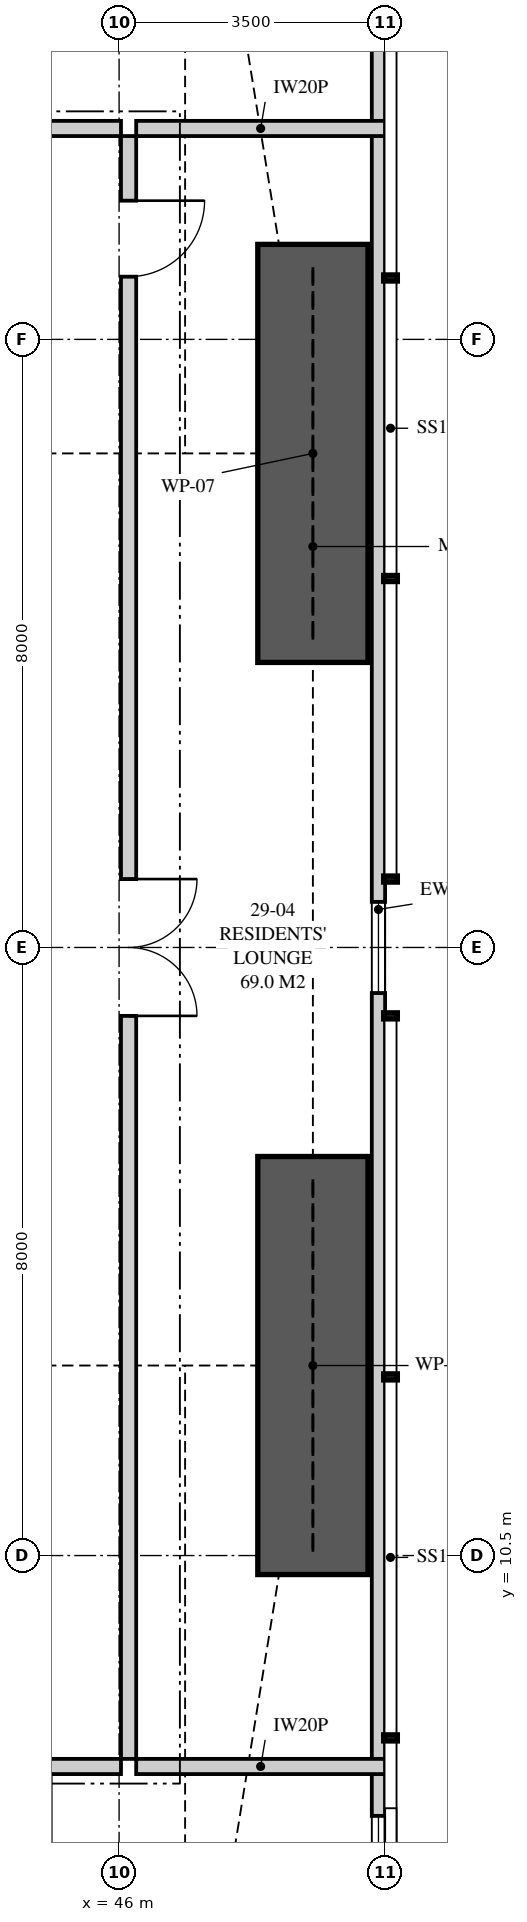
"""IFC4 building model, lengths in metres.
Left out: names, types, materials, properties, quantities, classifications, styles, units other than length and angle.
Written with IfcOpenShell. Run it as: python <this file> out.ifc"""

import sys

from ifc_helpers import new_model, si_unit, direction, frame, frame_2d, origin, place, context, subcontext, project, spatial, polyline, rectangle, outline, extrude, element, fill, save


model = new_model("IFC4")
c1 = context("Model", 3, precision=1e-05, world=origin(), true_north=direction((0.0, 1.0)))
c2 = subcontext(c1, "Body", "Model", "MODEL_VIEW")
j1 = project(units=[si_unit("LENGTHUNIT", "METRE"), si_unit("PLANEANGLEUNIT", "RADIAN")], contexts=[c1])
p1 = place(None, origin())
s1 = spatial("IfcSite", under=j1, at=p1, CompositionType="ELEMENT")
p2 = place(p1, origin())
s2 = spatial("IfcBuilding", under=s1, at=p2, CompositionType="ELEMENT")
p3 = place(p2, frame((0.0, 0.0, 108.2)))
s3 = spatial("IfcBuildingStorey", under=s2, at=p3, CompositionType="ELEMENT", Elevation=108.2)
p4 = place(p3, frame((49.413, 3.051, 0.0), z_axis=(0.0, 0.0, 1.0), x_axis=(0.0, 1.0, 0.0)))
e1 = element("IfcWall", 1, at=p4, inside=s3, PredefinedType="SOLIDWALL", context=c2, shape_type="SweptSolid", body=[
    extrude(outline(polyline([(0.0, 0.0), (31.897, 0.0), (31.897, 3.11), (22.167, 3.11), (22.167, 2.15), (22.074, 2.15), (22.074, 3.11), (21.949, 3.11), (21.949, 2.15), (9.949, 2.15), (9.949, 3.11), (9.823, 3.11), (9.823, 2.15), (9.73, 2.15), (9.73, 3.11), (0.0, 3.11), (0.0, 0.0)])), frame((0.0, 0.087, 0.0), z_axis=(0.0, -1.0, 0.0), x_axis=(1.0, 0.0, 0.0)), (0.0, 0.0, 1.0), 0.175),
])
p5 = place(p4, frame((2.224, 0.0, 0.4)))
e2 = element("IfcOpeningElement", 2, at=p5, cuts=e1, PredefinedType="OPENING", context=c2, shape_type="SweptSolid", body=[
    extrude(rectangle(XDim=1.8, YDim=1.7, at=frame_2d((0.9, 0.85))), frame((0.0, 0.097, 0.0), z_axis=(0.0, -1.0, 0.0), x_axis=(1.0, 0.0, 0.0)), (0.0, 0.0, 1.0), 0.195),
])
p6 = place(p4, frame((14.849, 0.0, 0.4)))
e3 = element("IfcOpeningElement", 3, at=p6, cuts=e1, PredefinedType="OPENING", context=c2, shape_type="SweptSolid", body=[
    extrude(rectangle(XDim=1.2, YDim=1.7, at=frame_2d((0.6, 0.85))), frame((0.0, 0.097, 0.0), z_axis=(0.0, -1.0, 0.0), x_axis=(1.0, 0.0, 0.0)), (0.0, 0.0, 1.0), 0.195),
])
p7 = place(p4, frame((28.51, 0.0, 0.4)))
e4 = element("IfcOpeningElement", 4, at=p7, cuts=e1, PredefinedType="OPENING", context=c2, shape_type="SweptSolid", body=[
    extrude(rectangle(XDim=1.2, YDim=1.7, at=frame_2d((0.6, 0.85))), frame((0.0, 0.097, 0.0), z_axis=(0.0, -1.0, 0.0), x_axis=(1.0, 0.0, 0.0)), (0.0, 0.0, 1.0), 0.195),
])
p8 = place(p3, frame((39.9, 7.725, 0.0), z_axis=(0.0, 0.0, 1.0), x_axis=(1.0, 0.0, 0.0)))
e5 = element("IfcWall", 5, at=p8, inside=s3, PredefinedType="PARTITIONING", context=c2, shape_type="SweptSolid", body=[
    extrude(rectangle(XDim=6.125, YDim=0.2, at=frame_2d((3.062, 0.0))), origin(), (0.0, 0.0, 1.0), 3.11),
])
p9 = place(p8, frame((1.5, 0.0, 0.0)))
e6 = element("IfcOpeningElement", 6, at=p9, cuts=e5, PredefinedType="OPENING", context=c2, shape_type="SweptSolid", body=[
    extrude(rectangle(XDim=1.05, YDim=2.2, at=frame_2d((0.525, 1.1))), frame((0.0, 0.11, 0.0), z_axis=(0.0, -1.0, 0.0), x_axis=(1.0, 0.0, 0.0)), (0.0, 0.0, 1.0), 0.22),
])
p10 = place(p3, frame((46.225, 7.725, 0.0), z_axis=(0.0, 0.0, 1.0), x_axis=(1.0, 0.0, 0.0)))
e7 = element("IfcWall", 7, at=p10, inside=s3, PredefinedType="PARTITIONING", context=c2, shape_type="SweptSolid", body=[
    extrude(outline(polyline([(0.0, 0.0), (3.275, 0.0), (3.275, 3.11), (2.392, 3.11), (2.392, 2.15), (0.643, 2.15), (0.643, 2.541), (0.306, 2.541), (0.306, 3.11), (0.0, 3.11), (0.0, 0.0)])), frame((0.0, 0.1, 0.0), z_axis=(0.0, -1.0, 0.0), x_axis=(1.0, 0.0, 0.0)), (0.0, 0.0, 1.0), 0.2),
])
p11 = place(p3, frame((40.75, 29.275, 0.0), z_axis=(0.0, 0.0, 1.0), x_axis=(1.0, 0.0, 0.0)))
e8 = element("IfcWall", 8, at=p11, inside=s3, PredefinedType="PARTITIONING", context=c2, shape_type="SweptSolid", body=[
    extrude(rectangle(XDim=5.275, YDim=0.2, at=frame_2d((2.637, 0.0))), origin(), (0.0, 0.0, 1.0), 3.11),
])
p12 = place(p11, frame((1.738, 0.0, 0.0)))
e9 = element("IfcOpeningElement", 9, at=p12, cuts=e8, PredefinedType="OPENING", context=c2, shape_type="SweptSolid", body=[
    extrude(rectangle(XDim=1.8, YDim=2.1, at=frame_2d((0.9, 1.05))), frame((0.0, 0.11, 0.0), z_axis=(0.0, -1.0, 0.0), x_axis=(1.0, 0.0, 0.0)), (0.0, 0.0, 1.0), 0.22),
])
p13 = place(p3, frame((46.225, 29.275, 0.0), z_axis=(0.0, 0.0, 1.0), x_axis=(1.0, 0.0, 0.0)))
e10 = element("IfcWall", 10, at=p13, inside=s3, PredefinedType="PARTITIONING", context=c2, shape_type="SweptSolid", body=[
    extrude(outline(polyline([(0.0, 0.0), (3.275, 0.0), (3.275, 3.11), (2.554, 3.11), (2.554, 2.15), (0.805, 2.15), (0.805, 2.541), (0.306, 2.541), (0.306, 3.11), (0.0, 3.11), (0.0, 0.0)])), frame((0.0, 0.1, 0.0), z_axis=(0.0, -1.0, 0.0), x_axis=(1.0, 0.0, 0.0)), (0.0, 0.0, 1.0), 0.2),
])
p14 = place(p3, frame((46.125, 7.825, 0.0), z_axis=(0.0, 0.0, 1.0), x_axis=(0.0, 1.0, 0.0)))
e11 = element("IfcWall", 11, at=p14, inside=s3, PredefinedType="PARTITIONING", context=c2, shape_type="SweptSolid", body=[
    extrude(outline(polyline([(0.0, 0.0), (21.35, 0.0), (21.35, 3.11), (17.512, 3.11), (17.512, 2.541), (16.838, 2.541), (16.838, 3.11), (5.512, 3.11), (5.512, 2.541), (4.838, 2.541), (4.838, 3.11), (0.0, 3.11), (0.0, 0.0)])), frame((0.0, 0.1, 0.0), z_axis=(0.0, -1.0, 0.0), x_axis=(1.0, 0.0, 0.0)), (0.0, 0.0, 1.0), 0.2),
])
p15 = place(p14, frame((9.775, 0.0, 0.0)))
e12 = element("IfcOpeningElement", 12, at=p15, cuts=e11, PredefinedType="OPENING", context=c2, shape_type="SweptSolid", body=[
    extrude(rectangle(XDim=1.8, YDim=2.1, at=frame_2d((0.9, 1.05))), frame((0.0, 0.11, 0.0), z_axis=(0.0, -1.0, 0.0), x_axis=(1.0, 0.0, 0.0)), (0.0, 0.0, 1.0), 0.22),
])
p16 = place(p14, frame((19.5, 0.0, 0.0)))
e13 = element("IfcOpeningElement", 13, at=p16, cuts=e11, PredefinedType="OPENING", context=c2, shape_type="SweptSolid", body=[
    extrude(rectangle(XDim=1.0, YDim=2.1, at=frame_2d((0.5, 1.05))), frame((0.0, 0.11, 0.0), z_axis=(0.0, -1.0, 0.0), x_axis=(1.0, 0.0, 0.0)), (0.0, 0.0, 1.0), 0.22),
])
for number, where, z_axis, x_axis in (
    (14, (48.55, 10.25, 0.0), (0.0, 0.0, 1.0), (0.0, 1.0, 0.0)),
    (15, (48.55, 22.25, 0.0), (0.0, 0.0, 1.0), (0.0, 1.0, 0.0)),
):
    element("IfcWall", number, at=place(p3, frame(where, z_axis=z_axis, x_axis=x_axis)), inside=s3, PredefinedType="SHEAR", context=c2, shape_type="SweptSolid", body=[
        extrude(rectangle(XDim=5.5, YDim=1.45, at=frame_2d((2.75, 0.0))), origin(), (0.0, 0.0, 1.0), 3.35),
    ])
p17 = place(p5, origin())
e16 = element("IfcWindow", 16, at=p17, inside=s3, PartitioningType="SINGLE_PANEL", PredefinedType="WINDOW", context=c2, shape_type="SweptSolid", body=[
    extrude(rectangle(XDim=1.8, YDim=1.7, at=frame_2d((0.9, 0.85))), frame((0.0, 0.03, 0.0), z_axis=(0.0, -1.0, 0.0), x_axis=(1.0, 0.0, 0.0)), (0.0, 0.0, 1.0), 0.06),
])
fill(e2, e16)
p18 = place(p6, origin())
e17 = element("IfcWindow", 17, at=p18, inside=s3, PartitioningType="SINGLE_PANEL", PredefinedType="WINDOW", context=c2, shape_type="SweptSolid", body=[
    extrude(rectangle(XDim=1.2, YDim=1.7, at=frame_2d((0.6, 0.85))), frame((0.0, 0.03, 0.0), z_axis=(0.0, -1.0, 0.0), x_axis=(1.0, 0.0, 0.0)), (0.0, 0.0, 1.0), 0.06),
])
fill(e3, e17)
p19 = place(p15, frame((1.8, 0.0, 0.0), z_axis=(0.0, 0.0, 1.0), x_axis=(-1.0, 0.0, 0.0)))
e18 = element("IfcDoor", 18, at=p19, inside=s3, OperationType="DOUBLE_DOOR_SINGLE_SWING", PredefinedType="DOOR", context=c2, shape_type="SweptSolid", body=[
    extrude(rectangle(XDim=1.8, YDim=2.1, at=frame_2d((0.9, 1.05))), frame((0.0, 0.025, 0.0), z_axis=(0.0, -1.0, 0.0), x_axis=(1.0, 0.0, 0.0)), (0.0, 0.0, 1.0), 0.05),
])
fill(e12, e18)
p20 = place(p16, frame((1.0, 0.0, 0.0), z_axis=(0.0, 0.0, 1.0), x_axis=(-1.0, 0.0, 0.0)))
e19 = element("IfcDoor", 19, at=p20, inside=s3, OperationType="SINGLE_SWING_LEFT", PredefinedType="DOOR", context=c2, shape_type="SweptSolid", body=[
    extrude(rectangle(XDim=1.0, YDim=2.1, at=frame_2d((0.5, 1.05))), frame((0.0, 0.025, 0.0), z_axis=(0.0, -1.0, 0.0), x_axis=(1.0, 0.0, 0.0)), (0.0, 0.0, 1.0), 0.05),
])
fill(e13, e19)
save(model, sys.argv[1])
